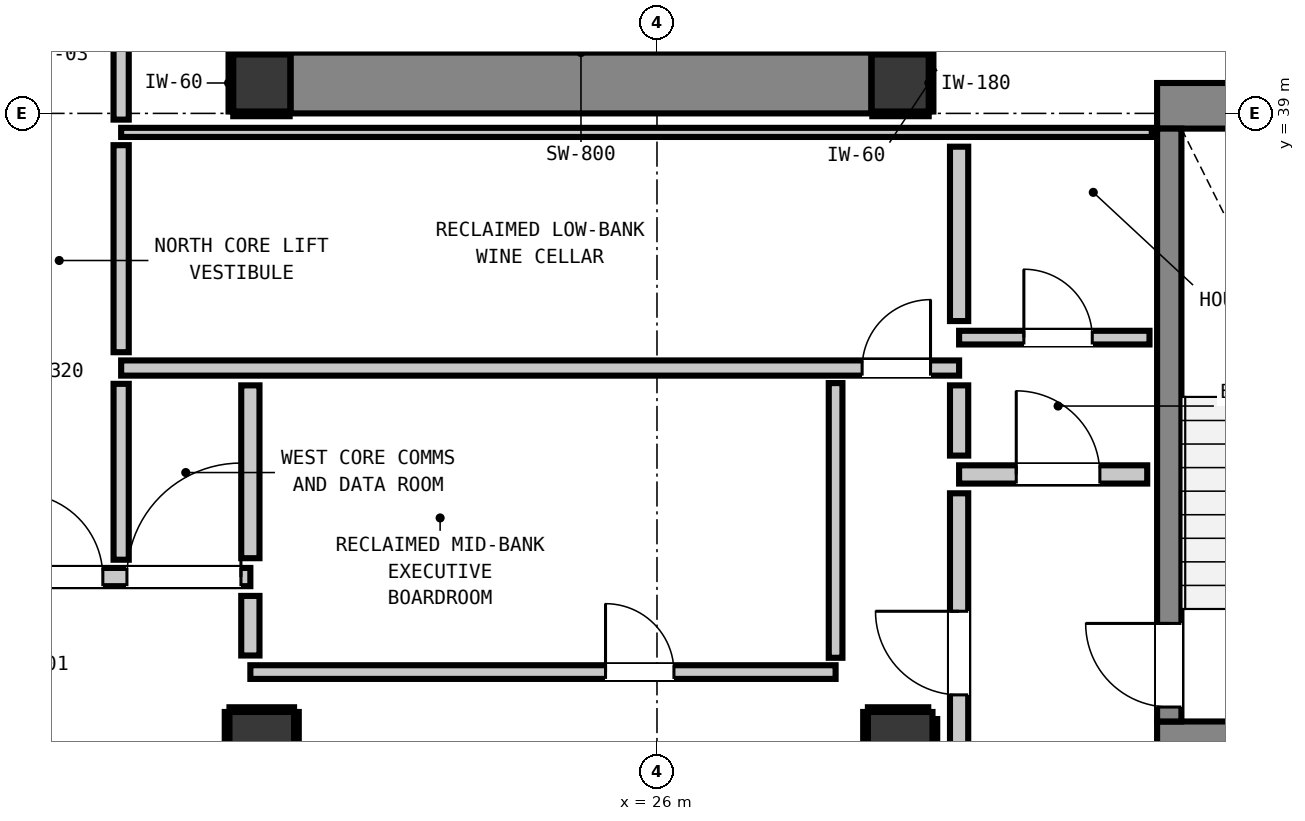
"""IFC4 building model, lengths in metres.
Left out: names, types, materials, properties, quantities, classifications, styles, units other than length and angle.
Written with IfcOpenShell. Run it as: python <this file> out.ifc"""

import sys

from ifc_helpers import new_model, si_unit, direction, frame, frame_2d, origin, origin_2d, place, context, subcontext, project, spatial, rectangle, extrude, element, fill, save


model = new_model("IFC4")
c1 = context("Model", 3, precision=1e-05, world=origin(), true_north=direction((0.0, 1.0)))
c2 = subcontext(c1, "Body", "Model", "MODEL_VIEW")
j1 = project(units=[si_unit("LENGTHUNIT", "METRE"), si_unit("PLANEANGLEUNIT", "RADIAN")], contexts=[c1])
p1 = place(None, origin())
s1 = spatial("IfcSite", under=j1, at=p1, CompositionType="ELEMENT")
p2 = place(p1, origin())
s2 = spatial("IfcBuilding", under=s1, at=p2, CompositionType="ELEMENT")
p3 = place(p2, frame((0.0, 0.0, 180.2)))
s3 = spatial("IfcBuildingStorey", under=s2, at=p3, CompositionType="ELEMENT", Elevation=180.2)
for number, where, z_axis, x_axis in (
    (1, (20.8, 39.4, 0.0), (0.0, 0.0, 1.0), (1.0, 0.0, 0.0)),
    (2, (29.2, 39.4, 0.0), (0.0, 0.0, 1.0), (1.0, 0.0, 0.0)),
):
    element("IfcColumn", number, at=place(p3, frame(where, z_axis=z_axis, x_axis=x_axis)), inside=s3, PredefinedType="COLUMN", context=c2, shape_type="SweptSolid", body=[
        extrude(rectangle(XDim=0.75, YDim=0.75, at=origin_2d()), origin(), (0.0, 0.0, 1.0), 3.32),
    ])
p4 = place(p3, frame((32.58, 39.1, 0.0), z_axis=(0.0, 0.0, 1.0), x_axis=(1.0, 0.0, 0.0)))
e3 = element("IfcWall", 3, at=p4, inside=s3, PredefinedType="SHEAR", context=c2, shape_type="SweptSolid", body=[
    extrude(rectangle(XDim=4.08, YDim=0.6, at=frame_2d((2.04, 0.0))), origin(), (0.0, 0.0, 1.0), 3.32),
])
p5 = place(p3, frame((32.58, 30.7, 0.0), z_axis=(0.0, 0.0, 1.0), x_axis=(1.0, 0.0, 0.0)))
e4 = element("IfcWall", 4, at=p5, inside=s3, PredefinedType="SHEAR", context=c2, shape_type="SweptSolid", body=[
    extrude(rectangle(XDim=3.54, YDim=0.6, at=frame_2d((1.77, 0.0))), origin(), (0.0, 0.0, 1.0), 3.32),
])
p6 = place(p3, frame((21.18, 39.4, 0.0), z_axis=(0.0, 0.0, 1.0), x_axis=(1.0, 0.0, 0.0)))
e5 = element("IfcWall", 5, at=p6, inside=s3, PredefinedType="SHEAR", context=c2, shape_type="SweptSolid", body=[
    extrude(rectangle(XDim=7.64, YDim=0.8, at=frame_2d((3.82, 0.0))), origin(), (0.0, 0.0, 1.0), 3.32),
])
p7 = place(p3, frame((32.74, 31.0, 0.0), z_axis=(0.0, 0.0, 1.0), x_axis=(0.0, 1.0, 0.0)))
e6 = element("IfcWall", 6, at=p7, inside=s3, PredefinedType="SHEAR", context=c2, shape_type="SweptSolid", body=[
    extrude(rectangle(XDim=7.8, YDim=0.32, at=frame_2d((3.9, 0.0))), origin(), (0.0, 0.0, 1.0), 3.32),
])
p8 = place(p7, frame((0.19, 0.0, 0.0)))
e7 = element("IfcOpeningElement", 7, at=p8, cuts=e6, PredefinedType="OPENING", context=c2, shape_type="SweptSolid", body=[
    extrude(rectangle(XDim=1.1, YDim=2.15, at=frame_2d((0.55, 1.075))), frame((0.0, 0.17, 0.0), z_axis=(0.0, -1.0, 0.0), x_axis=(1.0, 0.0, 0.0)), (0.0, 0.0, 1.0), 0.34),
])
for number, where, z_axis, x_axis in (
    (8, (20.8, 30.7, 0.0), (0.0, 0.0, 1.0), (1.0, 0.0, 0.0)),
    (9, (29.2, 30.7, 0.0), (0.0, 0.0, 1.0), (1.0, 0.0, 0.0)),
):
    element("IfcColumn", number, at=place(p3, frame(where, z_axis=z_axis, x_axis=x_axis)), inside=s3, PredefinedType="COLUMN", context=c2, shape_type="SweptSolid", body=[
        extrude(rectangle(XDim=0.85, YDim=0.85, at=origin_2d()), origin(), (0.0, 0.0, 1.0), 3.32),
    ])
p9 = place(p3, frame((17.45, 32.9, 0.0), z_axis=(0.0, 0.0, 1.0), x_axis=(1.0, 0.0, 0.0)))
e10 = element("IfcWall", 10, at=p9, inside=s3, PredefinedType="PARTITIONING", context=c2, shape_type="SweptSolid", body=[
    extrude(rectangle(XDim=3.2, YDim=0.24, at=frame_2d((1.6, 0.0))), origin(), (0.0, 0.0, 1.0), 3.08),
])
p10 = place(p9, frame((0.159, 0.0, 0.0)))
e11 = element("IfcOpeningElement", 11, at=p10, cuts=e10, PredefinedType="OPENING", context=c2, shape_type="SweptSolid", body=[
    extrude(rectangle(XDim=1.1, YDim=2.15, at=frame_2d((0.55, 1.075))), frame((0.0, 0.13, 0.0), z_axis=(0.0, -1.0, 0.0), x_axis=(1.0, 0.0, 0.0)), (0.0, 0.0, 1.0), 0.26),
])
p11 = place(p9, frame((1.576, 0.0, 0.0)))
e12 = element("IfcOpeningElement", 12, at=p11, cuts=e10, PredefinedType="OPENING", context=c2, shape_type="SweptSolid", body=[
    extrude(rectangle(XDim=1.5, YDim=2.15, at=frame_2d((0.75, 1.075))), frame((0.0, 0.13, 0.0), z_axis=(0.0, -1.0, 0.0), x_axis=(1.0, 0.0, 0.0)), (0.0, 0.0, 1.0), 0.26),
])
p12 = place(p3, frame((29.975, 34.25, 0.0), z_axis=(0.0, 0.0, 1.0), x_axis=(1.0, 0.0, 0.0)))
e13 = element("IfcWall", 13, at=p12, inside=s3, PredefinedType="PARTITIONING", context=c2, shape_type="SweptSolid", body=[
    extrude(rectangle(XDim=2.475, YDim=0.24, at=frame_2d((1.237, 0.0))), origin(), (0.0, 0.0, 1.0), 3.08),
])
p13 = place(p12, frame((0.752, 0.0, 0.0)))
e14 = element("IfcOpeningElement", 14, at=p13, cuts=e13, PredefinedType="OPENING", context=c2, shape_type="SweptSolid", body=[
    extrude(rectangle(XDim=1.1, YDim=2.15, at=frame_2d((0.55, 1.075))), frame((0.0, 0.13, 0.0), z_axis=(0.0, -1.0, 0.0), x_axis=(1.0, 0.0, 0.0)), (0.0, 0.0, 1.0), 0.26),
])
p14 = place(p3, frame((18.95, 35.65, 0.0), z_axis=(0.0, 0.0, 1.0), x_axis=(1.0, 0.0, 0.0)))
e15 = element("IfcWall", 15, at=p14, inside=s3, PredefinedType="PARTITIONING", context=c2, shape_type="SweptSolid", body=[
    extrude(rectangle(XDim=11.025, YDim=0.2, at=frame_2d((5.513, 0.0))), origin(), (0.0, 0.0, 1.0), 3.08),
])
p15 = place(p14, frame((9.749, 0.0, 0.0)))
e16 = element("IfcOpeningElement", 16, at=p15, cuts=e15, PredefinedType="OPENING", context=c2, shape_type="SweptSolid", body=[
    extrude(rectangle(XDim=0.9, YDim=2.1, at=frame_2d((0.45, 1.05))), frame((0.0, 0.11, 0.0), z_axis=(0.0, -1.0, 0.0), x_axis=(1.0, 0.0, 0.0)), (0.0, 0.0, 1.0), 0.22),
])
p16 = place(p3, frame((20.65, 31.65, 0.0), z_axis=(0.0, 0.0, 1.0), x_axis=(1.0, 0.0, 0.0)))
e17 = element("IfcWall", 17, at=p16, inside=s3, PredefinedType="PARTITIONING", context=c2, shape_type="SweptSolid", body=[
    extrude(rectangle(XDim=7.7, YDim=0.18, at=frame_2d((3.85, 0.0))), origin(), (0.0, 0.0, 1.0), 3.08),
])
p17 = place(p16, frame((4.673, 0.0, 0.0)))
e18 = element("IfcOpeningElement", 18, at=p17, cuts=e17, PredefinedType="OPENING", context=c2, shape_type="SweptSolid", body=[
    extrude(rectangle(XDim=0.9, YDim=2.1, at=frame_2d((0.45, 1.05))), frame((0.0, 0.1, 0.0), z_axis=(0.0, -1.0, 0.0), x_axis=(1.0, 0.0, 0.0)), (0.0, 0.0, 1.0), 0.2),
])
p18 = place(p3, frame((29.975, 36.05, 0.0), z_axis=(0.0, 0.0, 1.0), x_axis=(1.0, 0.0, 0.0)))
e19 = element("IfcWall", 19, at=p18, inside=s3, PredefinedType="PARTITIONING", context=c2, shape_type="SweptSolid", body=[
    extrude(rectangle(XDim=2.505, YDim=0.18, at=frame_2d((1.252, 0.0))), origin(), (0.0, 0.0, 1.0), 3.08),
])
p19 = place(p18, frame((0.852, 0.0, 0.0)))
e20 = element("IfcOpeningElement", 20, at=p19, cuts=e19, PredefinedType="OPENING", context=c2, shape_type="SweptSolid", body=[
    extrude(rectangle(XDim=0.9, YDim=2.1, at=frame_2d((0.45, 1.05))), frame((0.0, 0.1, 0.0), z_axis=(0.0, -1.0, 0.0), x_axis=(1.0, 0.0, 0.0)), (0.0, 0.0, 1.0), 0.2),
])
p20 = place(p3, frame((18.95, 38.75, 0.0), z_axis=(0.0, 0.0, 1.0), x_axis=(1.0, 0.0, 0.0)))
e21 = element("IfcWall", 21, at=p20, inside=s3, PredefinedType="PARTITIONING", context=c2, shape_type="SweptSolid", body=[
    extrude(rectangle(XDim=13.56, YDim=0.12, at=frame_2d((6.78, 0.0))), origin(), (0.0, 0.0, 1.0), 3.08),
])
p21 = place(p3, frame((20.65, 31.868, 0.0), z_axis=(0.0, 0.0, 1.0), x_axis=(0.0, 1.0, 0.0)))
e22 = element("IfcWall", 22, at=p21, inside=s3, PredefinedType="PARTITIONING", context=c2, shape_type="SweptSolid", body=[
    extrude(rectangle(XDim=0.784, YDim=0.24, at=frame_2d((0.392, 0.0))), origin(), (0.0, 0.0, 1.0), 2.315),
])
p22 = place(p3, frame((20.65, 33.148, 0.0), z_axis=(0.0, 0.0, 1.0), x_axis=(0.0, 1.0, 0.0)))
e23 = element("IfcWall", 23, at=p22, inside=s3, PredefinedType="PARTITIONING", context=c2, shape_type="SweptSolid", body=[
    extrude(rectangle(XDim=2.274, YDim=0.24, at=frame_2d((1.137, 0.0))), origin(), (0.0, 0.0, 1.0), 2.315),
])
p23 = place(p3, frame((29.975, 29.768, 0.0), z_axis=(0.0, 0.0, 1.0), x_axis=(0.0, 1.0, 0.0)))
e24 = element("IfcWall", 24, at=p23, inside=s3, PredefinedType="PARTITIONING", context=c2, shape_type="SweptSolid", body=[
    extrude(rectangle(XDim=4.234, YDim=0.24, at=frame_2d((2.117, 0.0))), origin(), (0.0, 0.0, 1.0), 3.08),
])
p24 = place(p23, frame((1.582, 0.0, 0.0)))
e25 = element("IfcOpeningElement", 25, at=p24, cuts=e24, PredefinedType="OPENING", context=c2, shape_type="SweptSolid", body=[
    extrude(rectangle(XDim=1.1, YDim=2.15, at=frame_2d((0.55, 1.075))), frame((0.0, 0.13, 0.0), z_axis=(0.0, -1.0, 0.0), x_axis=(1.0, 0.0, 0.0)), (0.0, 0.0, 1.0), 0.26),
])
p25 = place(p3, frame((29.975, 34.498, 0.0), z_axis=(0.0, 0.0, 1.0), x_axis=(0.0, 1.0, 0.0)))
e26 = element("IfcWall", 26, at=p25, inside=s3, PredefinedType="PARTITIONING", context=c2, shape_type="SweptSolid", body=[
    extrude(rectangle(XDim=0.924, YDim=0.24, at=frame_2d((0.462, 0.0))), origin(), (0.0, 0.0, 1.0), 3.08),
])
p26 = place(p3, frame((29.975, 36.268, 0.0), z_axis=(0.0, 0.0, 1.0), x_axis=(0.0, 1.0, 0.0)))
e27 = element("IfcWall", 27, at=p26, inside=s3, PredefinedType="PARTITIONING", context=c2, shape_type="SweptSolid", body=[
    extrude(rectangle(XDim=2.294, YDim=0.24, at=frame_2d((1.147, 0.0))), origin(), (0.0, 0.0, 1.0), 3.08),
])
p27 = place(p3, frame((18.95, 33.128, 0.0), z_axis=(0.0, 0.0, 1.0), x_axis=(0.0, 1.0, 0.0)))
e28 = element("IfcWall", 28, at=p27, inside=s3, PredefinedType="PARTITIONING", context=c2, shape_type="SweptSolid", body=[
    extrude(rectangle(XDim=2.314, YDim=0.2, at=frame_2d((1.157, 0.0))), origin(), (0.0, 0.0, 1.0), 3.08),
])
p28 = place(p3, frame((18.95, 35.858, 0.0), z_axis=(0.0, 0.0, 1.0), x_axis=(0.0, 1.0, 0.0)))
e29 = element("IfcWall", 29, at=p28, inside=s3, PredefinedType="PARTITIONING", context=c2, shape_type="SweptSolid", body=[
    extrude(rectangle(XDim=2.724, YDim=0.2, at=frame_2d((1.362, 0.0))), origin(), (0.0, 0.0, 1.0), 3.08),
])
p29 = place(p3, frame((18.95, 38.918, 0.0), z_axis=(0.0, 0.0, 1.0), x_axis=(0.0, 1.0, 0.0)))
e30 = element("IfcWall", 30, at=p29, inside=s3, PredefinedType="PARTITIONING", context=c2, shape_type="SweptSolid", body=[
    extrude(rectangle(XDim=1.134, YDim=0.2, at=frame_2d((0.567, 0.0))), origin(), (0.0, 0.0, 1.0), 3.08),
])
p30 = place(p3, frame((28.35, 31.838, 0.0), z_axis=(0.0, 0.0, 1.0), x_axis=(0.0, 1.0, 0.0)))
e31 = element("IfcWall", 31, at=p30, inside=s3, PredefinedType="PARTITIONING", context=c2, shape_type="SweptSolid", body=[
    extrude(rectangle(XDim=3.614, YDim=0.18, at=frame_2d((1.807, 0.0))), origin(), (0.0, 0.0, 1.0), 3.08),
])
for number, where, z_axis, x_axis in (
    (32, (20.425, 38.993, 0.0), (0.0, 0.0, 1.0), (1.0, 0.0, 0.0)),
    (33, (20.425, 39.807, 0.0), (0.0, 0.0, 1.0), (1.0, 0.0, 0.0)),
):
    element("IfcWall", number, at=place(p3, frame(where, z_axis=z_axis, x_axis=x_axis)), inside=s3, PredefinedType="PARTITIONING", context=c2, shape_type="SweptSolid", body=[
        extrude(rectangle(XDim=0.742, YDim=0.06, at=frame_2d((0.371, 0.0))), origin(), (0.0, 0.0, 1.0), 1.45),
    ])
p31 = place(p3, frame((20.393, 39.025, 0.0), z_axis=(0.0, 0.0, 1.0), x_axis=(0.0, 1.0, 0.0)))
e34 = element("IfcWall", 34, at=p31, inside=s3, PredefinedType="PARTITIONING", context=c2, shape_type="SweptSolid", body=[
    extrude(rectangle(XDim=0.75, YDim=0.06, at=frame_2d((0.375, 0.0))), origin(), (0.0, 0.0, 1.0), 1.45),
])
for number, where, z_axis, x_axis in (
    (35, (28.833, 38.993, 0.0), (0.0, 0.0, 1.0), (1.0, 0.0, 0.0)),
    (36, (28.833, 39.807, 0.0), (0.0, 0.0, 1.0), (1.0, 0.0, 0.0)),
):
    element("IfcWall", number, at=place(p3, frame(where, z_axis=z_axis, x_axis=x_axis)), inside=s3, PredefinedType="PARTITIONING", context=c2, shape_type="SweptSolid", body=[
        extrude(rectangle(XDim=0.742, YDim=0.06, at=frame_2d((0.371, 0.0))), origin(), (0.0, 0.0, 1.0), 1.45),
    ])
p32 = place(p3, frame((29.607, 39.025, 0.0), z_axis=(0.0, 0.0, 1.0), x_axis=(0.0, 1.0, 0.0)))
e37 = element("IfcWall", 37, at=p32, inside=s3, PredefinedType="PARTITIONING", context=c2, shape_type="SweptSolid", body=[
    extrude(rectangle(XDim=0.75, YDim=0.06, at=frame_2d((0.375, 0.0))), origin(), (0.0, 0.0, 1.0), 1.45),
])
for number, where, z_axis, x_axis in (
    (38, (20.375, 31.157, 0.0), (0.0, 0.0, 1.0), (1.0, 0.0, 0.0)),
    (39, (20.343, 30.275, 0.0), (0.0, 0.0, 1.0), (0.0, 1.0, 0.0)),
    (40, (21.257, 30.275, 0.0), (0.0, 0.0, 1.0), (0.0, 1.0, 0.0)),
):
    element("IfcWall", number, at=place(p3, frame(where, z_axis=z_axis, x_axis=x_axis)), inside=s3, PredefinedType="PARTITIONING", context=c2, shape_type="SweptSolid", body=[
        extrude(rectangle(XDim=0.85, YDim=0.06, at=frame_2d((0.425, 0.0))), origin(), (0.0, 0.0, 1.0), 1.45),
    ])
p33 = place(p3, frame((28.775, 31.157, 0.0), z_axis=(0.0, 0.0, 1.0), x_axis=(1.0, 0.0, 0.0)))
e41 = element("IfcWall", 41, at=p33, inside=s3, PredefinedType="PARTITIONING", context=c2, shape_type="SweptSolid", body=[
    extrude(rectangle(XDim=0.794, YDim=0.06, at=frame_2d((0.397, 0.0))), origin(), (0.0, 0.0, 1.0), 1.45),
])
p34 = place(p3, frame((28.743, 30.275, 0.0), z_axis=(0.0, 0.0, 1.0), x_axis=(0.0, 1.0, 0.0)))
e42 = element("IfcWall", 42, at=p34, inside=s3, PredefinedType="PARTITIONING", context=c2, shape_type="SweptSolid", body=[
    extrude(rectangle(XDim=0.85, YDim=0.06, at=frame_2d((0.425, 0.0))), origin(), (0.0, 0.0, 1.0), 1.45),
])
p35 = place(p3, frame((29.657, 30.275, 0.0), z_axis=(0.0, 0.0, 1.0), x_axis=(0.0, 1.0, 0.0)))
e43 = element("IfcWall", 43, at=p35, inside=s3, PredefinedType="PARTITIONING", context=c2, shape_type="SweptSolid", body=[
    extrude(rectangle(XDim=0.757, YDim=0.06, at=frame_2d((0.378, 0.0))), origin(), (0.0, 0.0, 1.0), 1.45),
])
p36 = place(p8, origin())
e44 = element("IfcDoor", 44, at=p36, inside=s3, OperationType="SINGLE_SWING_RIGHT", PredefinedType="DOOR", context=c2, shape_type="SweptSolid", body=[
    extrude(rectangle(XDim=1.1, YDim=2.15, at=frame_2d((0.55, 1.075))), frame((0.0, 0.025, 0.0), z_axis=(0.0, -1.0, 0.0), x_axis=(1.0, 0.0, 0.0)), (0.0, 0.0, 1.0), 0.05),
])
fill(e7, e44)
p37 = place(p10, origin())
e45 = element("IfcDoor", 45, at=p37, inside=s3, OperationType="SINGLE_SWING_LEFT", PredefinedType="DOOR", context=c2, shape_type="SweptSolid", body=[
    extrude(rectangle(XDim=1.1, YDim=2.15, at=frame_2d((0.55, 1.075))), frame((0.0, 0.025, 0.0), z_axis=(0.0, -1.0, 0.0), x_axis=(1.0, 0.0, 0.0)), (0.0, 0.0, 1.0), 0.05),
])
fill(e11, e45)
p38 = place(p24, origin())
e46 = element("IfcDoor", 46, at=p38, inside=s3, OperationType="SINGLE_SWING_RIGHT", PredefinedType="DOOR", context=c2, shape_type="SweptSolid", body=[
    extrude(rectangle(XDim=1.1, YDim=2.15, at=frame_2d((0.55, 1.075))), frame((0.0, 0.025, 0.0), z_axis=(0.0, -1.0, 0.0), x_axis=(1.0, 0.0, 0.0)), (0.0, 0.0, 1.0), 0.05),
])
fill(e25, e46)
p39 = place(p13, origin())
e47 = element("IfcDoor", 47, at=p39, inside=s3, OperationType="SINGLE_SWING_LEFT", PredefinedType="DOOR", context=c2, shape_type="SweptSolid", body=[
    extrude(rectangle(XDim=1.1, YDim=2.15, at=frame_2d((0.55, 1.075))), frame((0.0, 0.025, 0.0), z_axis=(0.0, -1.0, 0.0), x_axis=(1.0, 0.0, 0.0)), (0.0, 0.0, 1.0), 0.05),
])
fill(e14, e47)
p40 = place(p11, origin())
e48 = element("IfcDoor", 48, at=p40, inside=s3, OperationType="SINGLE_SWING_RIGHT", PredefinedType="DOOR", context=c2, shape_type="SweptSolid", body=[
    extrude(rectangle(XDim=1.5, YDim=2.15, at=frame_2d((0.75, 1.075))), frame((0.0, 0.025, 0.0), z_axis=(0.0, -1.0, 0.0), x_axis=(1.0, 0.0, 0.0)), (0.0, 0.0, 1.0), 0.05),
])
fill(e12, e48)
p41 = place(p19, origin())
e49 = element("IfcDoor", 49, at=p41, inside=s3, OperationType="SINGLE_SWING_LEFT", PredefinedType="DOOR", context=c2, shape_type="SweptSolid", body=[
    extrude(rectangle(XDim=0.9, YDim=2.1, at=frame_2d((0.45, 1.05))), frame((0.0, 0.025, 0.0), z_axis=(0.0, -1.0, 0.0), x_axis=(1.0, 0.0, 0.0)), (0.0, 0.0, 1.0), 0.05),
])
fill(e20, e49)
p42 = place(p15, origin())
e50 = element("IfcDoor", 50, at=p42, inside=s3, OperationType="SINGLE_SWING_RIGHT", PredefinedType="DOOR", context=c2, shape_type="SweptSolid", body=[
    extrude(rectangle(XDim=0.9, YDim=2.1, at=frame_2d((0.45, 1.05))), frame((0.0, 0.025, 0.0), z_axis=(0.0, -1.0, 0.0), x_axis=(1.0, 0.0, 0.0)), (0.0, 0.0, 1.0), 0.05),
])
fill(e16, e50)
p43 = place(p17, origin())
e51 = element("IfcDoor", 51, at=p43, inside=s3, OperationType="SINGLE_SWING_LEFT", PredefinedType="DOOR", context=c2, shape_type="SweptSolid", body=[
    extrude(rectangle(XDim=0.9, YDim=2.1, at=frame_2d((0.45, 1.05))), frame((0.0, 0.025, 0.0), z_axis=(0.0, -1.0, 0.0), x_axis=(1.0, 0.0, 0.0)), (0.0, 0.0, 1.0), 0.05),
])
fill(e18, e51)
save(model, sys.argv[1])
